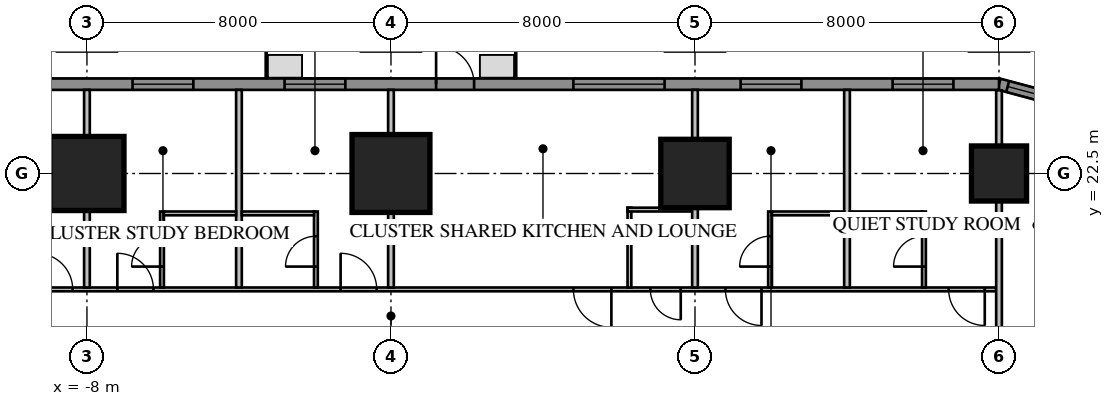
"""IFC4 building model, lengths in metres.
Left out: names, types, materials, properties, quantities, classifications, styles, units other than length and angle.
Written with IfcOpenShell. Run it as: python <this file> out.ifc"""

import sys

from ifc_helpers import new_model, si_unit, direction, frame, frame_2d, origin, origin_2d, place, context, subcontext, project, spatial, rectangle, extrude, element, fill, save


model = new_model("IFC4")
c1 = context("Model", 3, precision=1e-05, world=origin(), true_north=direction((0.0, 1.0)))
c2 = subcontext(c1, "Body", "Model", "MODEL_VIEW")
j1 = project(units=[si_unit("LENGTHUNIT", "METRE"), si_unit("PLANEANGLEUNIT", "RADIAN")], contexts=[c1])
p1 = place(None, origin())
s1 = spatial("IfcSite", under=j1, at=p1, CompositionType="ELEMENT")
p2 = place(p1, origin())
s2 = spatial("IfcBuilding", under=s1, at=p2, CompositionType="ELEMENT")
p3 = place(p2, frame((0.0, 0.0, 39.1)))
s3 = spatial("IfcBuildingStorey", under=s2, at=p3, CompositionType="ELEMENT", Elevation=39.1)
p4 = place(p3, frame((16.0, 22.5, 0.0), z_axis=(0.0, 0.0, 1.0), x_axis=(1.0, 0.0, 0.0)))
e1 = element("IfcColumn", 1, at=p4, inside=s3, PredefinedType="COLUMN", context=c2, shape_type="SweptSolid", body=[
    extrude(rectangle(XDim=1.45, YDim=1.45, at=origin_2d()), origin(), (0.0, 0.0, 1.0), 3.85),
])
p5 = place(p3, frame((8.0, 22.5, 0.0), z_axis=(0.0, 0.0, 1.0), x_axis=(1.0, 0.0, 0.0)))
e2 = element("IfcColumn", 2, at=p5, inside=s3, PredefinedType="COLUMN", context=c2, shape_type="SweptSolid", body=[
    extrude(rectangle(XDim=1.8, YDim=1.8, at=origin_2d()), origin(), (0.0, 0.0, 1.0), 3.85),
])
p6 = place(p3, frame((0.0, 22.5, 0.0), z_axis=(0.0, 0.0, 1.0), x_axis=(1.0, 0.0, 0.0)))
e3 = element("IfcColumn", 3, at=p6, inside=s3, PredefinedType="COLUMN", context=c2, shape_type="SweptSolid", body=[
    extrude(rectangle(XDim=2.05, YDim=2.05, at=origin_2d()), origin(), (0.0, 0.0, 1.0), 3.85),
])
p7 = place(p3, frame((-8.0, 22.5, 0.0), z_axis=(0.0, 0.0, 1.0), x_axis=(1.0, 0.0, 0.0)))
e4 = element("IfcColumn", 4, at=p7, inside=s3, PredefinedType="COLUMN", context=c2, shape_type="SweptSolid", body=[
    extrude(rectangle(XDim=1.95, YDim=1.95, at=origin_2d()), origin(), (0.0, 0.0, 1.0), 3.85),
])
p8 = place(p3, frame((20.425, 23.664, 0.0), z_axis=(0.0, 0.0, 1.0), x_axis=(-0.965920218567, 0.258839972501, 0.0)))
e5 = element("IfcWall", 5, at=p8, inside=s3, PredefinedType="SOLIDWALL", context=c2, shape_type="SweptSolid", body=[
    extrude(rectangle(XDim=4.581, YDim=0.3, at=frame_2d((2.291, 0.0))), origin(), (0.0, 0.0, 1.0), 3.65),
])
p9 = place(p8, frame((2.746, 0.0, 0.75)))
e6 = element("IfcOpeningElement", 6, at=p9, cuts=e5, PredefinedType="OPENING", context=c2, shape_type="SweptSolid", body=[
    extrude(rectangle(XDim=1.6, YDim=1.8, at=frame_2d((0.8, 0.9))), frame((0.0, 0.17, 0.0), z_axis=(0.0, -1.0, 0.0), x_axis=(1.0, 0.0, 0.0)), (0.0, 0.0, 1.0), 0.34),
])
p10 = place(p3, frame((16.0, 24.85, 0.0), z_axis=(0.0, 0.0, 1.0), x_axis=(-1.0, 0.0, 0.0)))
e7 = element("IfcWall", 7, at=p10, inside=s3, PredefinedType="SOLIDWALL", context=c2, shape_type="SweptSolid", body=[
    extrude(rectangle(XDim=32.0, YDim=0.3, at=frame_2d((16.0, 0.0))), origin(), (0.0, 0.0, 1.0), 3.65),
])
p11 = place(p10, frame((1.2, 0.0, 0.75)))
e8 = element("IfcOpeningElement", 8, at=p11, cuts=e7, PredefinedType="OPENING", context=c2, shape_type="SweptSolid", body=[
    extrude(rectangle(XDim=1.6, YDim=1.8, at=frame_2d((0.8, 0.9))), frame((0.0, 0.17, 0.0), z_axis=(0.0, -1.0, 0.0), x_axis=(1.0, 0.0, 0.0)), (0.0, 0.0, 1.0), 0.34),
])
p12 = place(p10, frame((5.2, 0.0, 0.75)))
e9 = element("IfcOpeningElement", 9, at=p12, cuts=e7, PredefinedType="OPENING", context=c2, shape_type="SweptSolid", body=[
    extrude(rectangle(XDim=1.6, YDim=1.8, at=frame_2d((0.8, 0.9))), frame((0.0, 0.17, 0.0), z_axis=(0.0, -1.0, 0.0), x_axis=(1.0, 0.0, 0.0)), (0.0, 0.0, 1.0), 0.34),
])
p13 = place(p10, frame((17.2, 0.0, 0.75)))
e10 = element("IfcOpeningElement", 10, at=p13, cuts=e7, PredefinedType="OPENING", context=c2, shape_type="SweptSolid", body=[
    extrude(rectangle(XDim=1.6, YDim=1.8, at=frame_2d((0.8, 0.9))), frame((0.0, 0.17, 0.0), z_axis=(0.0, -1.0, 0.0), x_axis=(1.0, 0.0, 0.0)), (0.0, 0.0, 1.0), 0.34),
])
p14 = place(p10, frame((21.2, 0.0, 0.75)))
e11 = element("IfcOpeningElement", 11, at=p14, cuts=e7, PredefinedType="OPENING", context=c2, shape_type="SweptSolid", body=[
    extrude(rectangle(XDim=1.6, YDim=1.8, at=frame_2d((0.8, 0.9))), frame((0.0, 0.17, 0.0), z_axis=(0.0, -1.0, 0.0), x_axis=(1.0, 0.0, 0.0)), (0.0, 0.0, 1.0), 0.34),
])
p15 = place(p10, frame((25.2, 0.0, 0.75)))
e12 = element("IfcOpeningElement", 12, at=p15, cuts=e7, PredefinedType="OPENING", context=c2, shape_type="SweptSolid", body=[
    extrude(rectangle(XDim=1.6, YDim=1.8, at=frame_2d((0.8, 0.9))), frame((0.0, 0.17, 0.0), z_axis=(0.0, -1.0, 0.0), x_axis=(1.0, 0.0, 0.0)), (0.0, 0.0, 1.0), 0.34),
])
p16 = place(p10, frame((29.2, 0.0, 0.75)))
e13 = element("IfcOpeningElement", 13, at=p16, cuts=e7, PredefinedType="OPENING", context=c2, shape_type="SweptSolid", body=[
    extrude(rectangle(XDim=1.6, YDim=1.8, at=frame_2d((0.8, 0.9))), frame((0.0, 0.17, 0.0), z_axis=(0.0, -1.0, 0.0), x_axis=(1.0, 0.0, 0.0)), (0.0, 0.0, 1.0), 0.34),
])
p17 = place(p10, frame((8.8, 0.0, 0.75)))
e14 = element("IfcOpeningElement", 14, at=p17, cuts=e7, PredefinedType="OPENING", context=c2, shape_type="SweptSolid", body=[
    extrude(rectangle(XDim=2.4, YDim=1.8, at=frame_2d((1.2, 0.9))), frame((0.0, 0.17, 0.0), z_axis=(0.0, -1.0, 0.0), x_axis=(1.0, 0.0, 0.0)), (0.0, 0.0, 1.0), 0.34),
])
p18 = place(p10, frame((13.812, 0.0, 0.0)))
e15 = element("IfcOpeningElement", 15, at=p18, cuts=e7, PredefinedType="OPENING", context=c2, shape_type="SweptSolid", body=[
    extrude(rectangle(XDim=1.0, YDim=2.4, at=frame_2d((0.5, 1.2))), frame((0.0, 0.17, 0.0), z_axis=(0.0, -1.0, 0.0), x_axis=(1.0, 0.0, 0.0)), (0.0, 0.0, 1.0), 0.34),
])
p19 = place(p3, frame((15.925, 19.45, 0.0), z_axis=(0.0, 0.0, 1.0), x_axis=(-1.0, 0.0, 0.0)))
e16 = element("IfcWall", 16, at=p19, inside=s3, PredefinedType="PARTITIONING", context=c2, shape_type="SweptSolid", body=[
    extrude(rectangle(XDim=31.85, YDim=0.1, at=frame_2d((15.925, 0.0))), origin(), (0.0, 0.0, 1.0), 3.65),
])
p20 = place(p19, frame((10.125, 0.0, 0.0)))
e17 = element("IfcOpeningElement", 17, at=p20, cuts=e16, PredefinedType="OPENING", context=c2, shape_type="SweptSolid", body=[
    extrude(rectangle(XDim=1.0, YDim=2.1, at=frame_2d((0.5, 1.05))), frame((0.0, 0.07, 0.0), z_axis=(0.0, -1.0, 0.0), x_axis=(1.0, 0.0, 0.0)), (0.0, 0.0, 1.0), 0.14),
])
p21 = place(p19, frame((8.3, 0.0, 0.0)))
e18 = element("IfcOpeningElement", 18, at=p21, cuts=e16, PredefinedType="OPENING", context=c2, shape_type="SweptSolid", body=[
    extrude(rectangle(XDim=0.8, YDim=2.1, at=frame_2d((0.4, 1.05))), frame((0.0, 0.07, 0.0), z_axis=(0.0, -1.0, 0.0), x_axis=(1.0, 0.0, 0.0)), (0.0, 0.0, 1.0), 0.14),
])
p22 = place(p19, frame((0.3, 0.0, 0.0)))
e19 = element("IfcOpeningElement", 19, at=p22, cuts=e16, PredefinedType="OPENING", context=c2, shape_type="SweptSolid", body=[
    extrude(rectangle(XDim=0.95, YDim=2.1, at=frame_2d((0.475, 1.05))), frame((0.0, 0.07, 0.0), z_axis=(0.0, -1.0, 0.0), x_axis=(1.0, 0.0, 0.0)), (0.0, 0.0, 1.0), 0.14),
])
p23 = place(p19, frame((6.175, 0.0, 0.0)))
e20 = element("IfcOpeningElement", 20, at=p23, cuts=e16, PredefinedType="OPENING", context=c2, shape_type="SweptSolid", body=[
    extrude(rectangle(XDim=0.95, YDim=2.1, at=frame_2d((0.475, 1.05))), frame((0.0, 0.07, 0.0), z_axis=(0.0, -1.0, 0.0), x_axis=(1.0, 0.0, 0.0)), (0.0, 0.0, 1.0), 0.14),
])
p24 = place(p19, frame((16.3, 0.0, 0.0)))
e21 = element("IfcOpeningElement", 21, at=p24, cuts=e16, PredefinedType="OPENING", context=c2, shape_type="SweptSolid", body=[
    extrude(rectangle(XDim=0.95, YDim=2.1, at=frame_2d((0.475, 1.05))), frame((0.0, 0.07, 0.0), z_axis=(0.0, -1.0, 0.0), x_axis=(1.0, 0.0, 0.0)), (0.0, 0.0, 1.0), 0.14),
])
p25 = place(p19, frame((22.175, 0.0, 0.0)))
e22 = element("IfcOpeningElement", 22, at=p25, cuts=e16, PredefinedType="OPENING", context=c2, shape_type="SweptSolid", body=[
    extrude(rectangle(XDim=0.95, YDim=2.1, at=frame_2d((0.475, 1.05))), frame((0.0, 0.07, 0.0), z_axis=(0.0, -1.0, 0.0), x_axis=(1.0, 0.0, 0.0)), (0.0, 0.0, 1.0), 0.14),
])
p26 = place(p19, frame((24.3, 0.0, 0.0)))
e23 = element("IfcOpeningElement", 23, at=p26, cuts=e16, PredefinedType="OPENING", context=c2, shape_type="SweptSolid", body=[
    extrude(rectangle(XDim=0.95, YDim=2.1, at=frame_2d((0.475, 1.05))), frame((0.0, 0.07, 0.0), z_axis=(0.0, -1.0, 0.0), x_axis=(1.0, 0.0, 0.0)), (0.0, 0.0, 1.0), 0.14),
])
p27 = place(p19, frame((30.175, 0.0, 0.0)))
e24 = element("IfcOpeningElement", 24, at=p27, cuts=e16, PredefinedType="OPENING", context=c2, shape_type="SweptSolid", body=[
    extrude(rectangle(XDim=0.95, YDim=2.1, at=frame_2d((0.475, 1.05))), frame((0.0, 0.07, 0.0), z_axis=(0.0, -1.0, 0.0), x_axis=(1.0, 0.0, 0.0)), (0.0, 0.0, 1.0), 0.14),
])
p28 = place(p3, frame((6.275, 19.5, 0.0), z_axis=(0.0, 0.0, 1.0), x_axis=(0.0, 1.0, 0.0)))
e25 = element("IfcWall", 25, at=p28, inside=s3, PredefinedType="PARTITIONING", context=c2, shape_type="SweptSolid", body=[
    extrude(rectangle(XDim=2.1, YDim=0.1, at=frame_2d((1.05, 0.0))), origin(), (0.0, 0.0, 1.0), 3.65),
])
p29 = place(p3, frame((7.925, 21.55, 0.0), z_axis=(0.0, 0.0, 1.0), x_axis=(-1.0, 0.0, 0.0)))
e26 = element("IfcWall", 26, at=p29, inside=s3, PredefinedType="PARTITIONING", context=c2, shape_type="SweptSolid", body=[
    extrude(rectangle(XDim=1.7, YDim=0.1, at=frame_2d((0.85, 0.0))), origin(), (0.0, 0.0, 1.0), 3.65),
])
p30 = place(p3, frame((16.0, 18.1, 0.0), z_axis=(0.0, 0.0, 1.0), x_axis=(0.0, 1.0, 0.0)))
e27 = element("IfcWall", 27, at=p30, inside=s3, PredefinedType="PARTITIONING", context=c2, shape_type="SweptSolid", body=[
    extrude(rectangle(XDim=6.589, YDim=0.15, at=frame_2d((3.295, 0.0))), origin(), (0.0, 0.0, 1.0), 3.65),
])
for number, where, z_axis, x_axis in (
    (28, (12.0, 19.5, 0.0), (0.0, 0.0, 1.0), (0.0, 1.0, 0.0)),
    (29, (8.0, 19.5, 0.0), (0.0, 0.0, 1.0), (0.0, 1.0, 0.0)),
):
    element("IfcWall", number, at=place(p3, frame(where, z_axis=z_axis, x_axis=x_axis)), inside=s3, PredefinedType="PARTITIONING", context=c2, shape_type="SweptSolid", body=[
        extrude(rectangle(XDim=5.2, YDim=0.15, at=frame_2d((2.6, 0.0))), origin(), (0.0, 0.0, 1.0), 3.65),
    ])
p31 = place(p3, frame((0.0, 19.5, 0.0), z_axis=(0.0, 0.0, 1.0), x_axis=(0.0, 1.0, 0.0)))
e30 = element("IfcWall", 30, at=p31, inside=s3, PredefinedType="PARTITIONING", context=c2, shape_type="SweptSolid", body=[
    extrude(rectangle(XDim=5.2, YDim=0.15, at=frame_2d((2.6, 0.0))), origin(), (0.0, 0.0, 1.0), 2.809),
])
for number, where, z_axis, x_axis in (
    (31, (-4.0, 19.5, 0.0), (0.0, 0.0, 1.0), (0.0, 1.0, 0.0)),
    (32, (-8.0, 19.5, 0.0), (0.0, 0.0, 1.0), (0.0, 1.0, 0.0)),
):
    element("IfcWall", number, at=place(p3, frame(where, z_axis=z_axis, x_axis=x_axis)), inside=s3, PredefinedType="PARTITIONING", context=c2, shape_type="SweptSolid", body=[
        extrude(rectangle(XDim=5.2, YDim=0.15, at=frame_2d((2.6, 0.0))), origin(), (0.0, 0.0, 1.0), 3.65),
    ])
p32 = place(p3, frame((14.025, 19.5, 0.0), z_axis=(0.0, 0.0, 1.0), x_axis=(0.0, 1.0, 0.0)))
e33 = element("IfcWall", 33, at=p32, inside=s3, PredefinedType="PARTITIONING", context=c2, shape_type="SweptSolid", body=[
    extrude(rectangle(XDim=2.0, YDim=0.1, at=frame_2d((1.0, 0.0))), origin(), (0.0, 0.0, 1.0), 3.65),
])
p33 = place(p32, frame((0.55, 0.0, 0.0)))
e34 = element("IfcOpeningElement", 34, at=p33, cuts=e33, PredefinedType="OPENING", context=c2, shape_type="SweptSolid", body=[
    extrude(rectangle(XDim=0.8, YDim=2.1, at=frame_2d((0.4, 1.05))), frame((0.0, 0.07, 0.0), z_axis=(0.0, -1.0, 0.0), x_axis=(1.0, 0.0, 0.0)), (0.0, 0.0, 1.0), 0.14),
])
p34 = place(p3, frame((13.975, 21.45, 0.0), z_axis=(0.0, 0.0, 1.0), x_axis=(-1.0, 0.0, 0.0)))
e35 = element("IfcWall", 35, at=p34, inside=s3, PredefinedType="PARTITIONING", context=c2, shape_type="SweptSolid", body=[
    extrude(rectangle(XDim=1.9, YDim=0.1, at=frame_2d((0.95, 0.0))), origin(), (0.0, 0.0, 1.0), 3.65),
])
p35 = place(p3, frame((9.975, 19.5, 0.0), z_axis=(0.0, 0.0, 1.0), x_axis=(0.0, 1.0, 0.0)))
e36 = element("IfcWall", 36, at=p35, inside=s3, PredefinedType="PARTITIONING", context=c2, shape_type="SweptSolid", body=[
    extrude(rectangle(XDim=2.0, YDim=0.1, at=frame_2d((1.0, 0.0))), origin(), (0.0, 0.0, 1.0), 3.65),
])
p36 = place(p35, frame((0.55, 0.0, 0.0)))
e37 = element("IfcOpeningElement", 37, at=p36, cuts=e36, PredefinedType="OPENING", context=c2, shape_type="SweptSolid", body=[
    extrude(rectangle(XDim=0.8, YDim=2.1, at=frame_2d((0.4, 1.05))), frame((0.0, 0.07, 0.0), z_axis=(0.0, -1.0, 0.0), x_axis=(1.0, 0.0, 0.0)), (0.0, 0.0, 1.0), 0.14),
])
p37 = place(p3, frame((11.925, 21.45, 0.0), z_axis=(0.0, 0.0, 1.0), x_axis=(-1.0, 0.0, 0.0)))
e38 = element("IfcWall", 38, at=p37, inside=s3, PredefinedType="PARTITIONING", context=c2, shape_type="SweptSolid", body=[
    extrude(rectangle(XDim=1.9, YDim=0.1, at=frame_2d((0.95, 0.0))), origin(), (0.0, 0.0, 1.0), 3.65),
])
p38 = place(p3, frame((-1.975, 19.5, 0.0), z_axis=(0.0, 0.0, 1.0), x_axis=(0.0, 1.0, 0.0)))
e39 = element("IfcWall", 39, at=p38, inside=s3, PredefinedType="PARTITIONING", context=c2, shape_type="SweptSolid", body=[
    extrude(rectangle(XDim=2.0, YDim=0.1, at=frame_2d((1.0, 0.0))), origin(), (0.0, 0.0, 1.0), 3.65),
])
p39 = place(p38, frame((0.55, 0.0, 0.0)))
e40 = element("IfcOpeningElement", 40, at=p39, cuts=e39, PredefinedType="OPENING", context=c2, shape_type="SweptSolid", body=[
    extrude(rectangle(XDim=0.8, YDim=2.1, at=frame_2d((0.4, 1.05))), frame((0.0, 0.07, 0.0), z_axis=(0.0, -1.0, 0.0), x_axis=(1.0, 0.0, 0.0)), (0.0, 0.0, 1.0), 0.14),
])
p40 = place(p3, frame((-2.025, 21.45, 0.0), z_axis=(0.0, 0.0, 1.0), x_axis=(-1.0, 0.0, 0.0)))
e41 = element("IfcWall", 41, at=p40, inside=s3, PredefinedType="PARTITIONING", context=c2, shape_type="SweptSolid", body=[
    extrude(rectangle(XDim=1.9, YDim=0.1, at=frame_2d((0.95, 0.0))), origin(), (0.0, 0.0, 1.0), 3.65),
])
p41 = place(p3, frame((-6.025, 19.5, 0.0), z_axis=(0.0, 0.0, 1.0), x_axis=(0.0, 1.0, 0.0)))
e42 = element("IfcWall", 42, at=p41, inside=s3, PredefinedType="PARTITIONING", context=c2, shape_type="SweptSolid", body=[
    extrude(rectangle(XDim=2.0, YDim=0.1, at=frame_2d((1.0, 0.0))), origin(), (0.0, 0.0, 1.0), 3.65),
])
p42 = place(p41, frame((0.55, 0.0, 0.0)))
e43 = element("IfcOpeningElement", 43, at=p42, cuts=e42, PredefinedType="OPENING", context=c2, shape_type="SweptSolid", body=[
    extrude(rectangle(XDim=0.8, YDim=2.1, at=frame_2d((0.4, 1.05))), frame((0.0, 0.07, 0.0), z_axis=(0.0, -1.0, 0.0), x_axis=(1.0, 0.0, 0.0)), (0.0, 0.0, 1.0), 0.14),
])
p43 = place(p3, frame((-4.075, 21.45, 0.0), z_axis=(0.0, 0.0, 1.0), x_axis=(-1.0, 0.0, 0.0)))
e44 = element("IfcWall", 44, at=p43, inside=s3, PredefinedType="PARTITIONING", context=c2, shape_type="SweptSolid", body=[
    extrude(rectangle(XDim=1.9, YDim=0.1, at=frame_2d((0.95, 0.0))), origin(), (0.0, 0.0, 1.0), 3.65),
])
p44 = place(p9, origin())
e45 = element("IfcWindow", 45, at=p44, inside=s3, PartitioningType="SINGLE_PANEL", PredefinedType="WINDOW", context=c2, shape_type="SweptSolid", body=[
    extrude(rectangle(XDim=1.6, YDim=1.8, at=frame_2d((0.8, 0.9))), frame((0.0, 0.03, 0.0), z_axis=(0.0, -1.0, 0.0), x_axis=(1.0, 0.0, 0.0)), (0.0, 0.0, 1.0), 0.06),
])
fill(e6, e45)
p45 = place(p11, origin())
e46 = element("IfcWindow", 46, at=p45, inside=s3, PartitioningType="SINGLE_PANEL", PredefinedType="WINDOW", context=c2, shape_type="SweptSolid", body=[
    extrude(rectangle(XDim=1.6, YDim=1.8, at=frame_2d((0.8, 0.9))), frame((0.0, 0.03, 0.0), z_axis=(0.0, -1.0, 0.0), x_axis=(1.0, 0.0, 0.0)), (0.0, 0.0, 1.0), 0.06),
])
fill(e8, e46)
p46 = place(p12, origin())
e47 = element("IfcWindow", 47, at=p46, inside=s3, PartitioningType="SINGLE_PANEL", PredefinedType="WINDOW", context=c2, shape_type="SweptSolid", body=[
    extrude(rectangle(XDim=1.6, YDim=1.8, at=frame_2d((0.8, 0.9))), frame((0.0, 0.03, 0.0), z_axis=(0.0, -1.0, 0.0), x_axis=(1.0, 0.0, 0.0)), (0.0, 0.0, 1.0), 0.06),
])
fill(e9, e47)
p47 = place(p13, origin())
e48 = element("IfcWindow", 48, at=p47, inside=s3, PartitioningType="SINGLE_PANEL", PredefinedType="WINDOW", context=c2, shape_type="SweptSolid", body=[
    extrude(rectangle(XDim=1.6, YDim=1.8, at=frame_2d((0.8, 0.9))), frame((0.0, 0.03, 0.0), z_axis=(0.0, -1.0, 0.0), x_axis=(1.0, 0.0, 0.0)), (0.0, 0.0, 1.0), 0.06),
])
fill(e10, e48)
p48 = place(p14, origin())
e49 = element("IfcWindow", 49, at=p48, inside=s3, PartitioningType="SINGLE_PANEL", PredefinedType="WINDOW", context=c2, shape_type="SweptSolid", body=[
    extrude(rectangle(XDim=1.6, YDim=1.8, at=frame_2d((0.8, 0.9))), frame((0.0, 0.03, 0.0), z_axis=(0.0, -1.0, 0.0), x_axis=(1.0, 0.0, 0.0)), (0.0, 0.0, 1.0), 0.06),
])
fill(e11, e49)
p49 = place(p17, origin())
e50 = element("IfcWindow", 50, at=p49, inside=s3, PartitioningType="SINGLE_PANEL", PredefinedType="WINDOW", context=c2, shape_type="SweptSolid", body=[
    extrude(rectangle(XDim=2.4, YDim=1.8, at=frame_2d((1.2, 0.9))), frame((0.0, 0.03, 0.0), z_axis=(0.0, -1.0, 0.0), x_axis=(1.0, 0.0, 0.0)), (0.0, 0.0, 1.0), 0.06),
])
fill(e14, e50)
p50 = place(p18, origin())
e51 = element("IfcDoor", 51, at=p50, inside=s3, OperationType="SINGLE_SWING_RIGHT", PredefinedType="DOOR", context=c2, shape_type="SweptSolid", body=[
    extrude(rectangle(XDim=1.0, YDim=2.4, at=frame_2d((0.5, 1.2))), frame((0.0, 0.025, 0.0), z_axis=(0.0, -1.0, 0.0), x_axis=(1.0, 0.0, 0.0)), (0.0, 0.0, 1.0), 0.05),
])
fill(e15, e51)
p51 = place(p20, origin())
e52 = element("IfcDoor", 52, at=p51, inside=s3, OperationType="SINGLE_SWING_LEFT", PredefinedType="DOOR", context=c2, shape_type="SweptSolid", body=[
    extrude(rectangle(XDim=1.0, YDim=2.1, at=frame_2d((0.5, 1.05))), frame((0.0, 0.025, 0.0), z_axis=(0.0, -1.0, 0.0), x_axis=(1.0, 0.0, 0.0)), (0.0, 0.0, 1.0), 0.05),
])
fill(e17, e52)
p52 = place(p21, origin())
e53 = element("IfcDoor", 53, at=p52, inside=s3, OperationType="SINGLE_SWING_LEFT", PredefinedType="DOOR", context=c2, shape_type="SweptSolid", body=[
    extrude(rectangle(XDim=0.8, YDim=2.1, at=frame_2d((0.4, 1.05))), frame((0.0, 0.025, 0.0), z_axis=(0.0, -1.0, 0.0), x_axis=(1.0, 0.0, 0.0)), (0.0, 0.0, 1.0), 0.05),
])
fill(e18, e53)
p53 = place(p22, origin())
e54 = element("IfcDoor", 54, at=p53, inside=s3, OperationType="SINGLE_SWING_LEFT", PredefinedType="DOOR", context=c2, shape_type="SweptSolid", body=[
    extrude(rectangle(XDim=0.95, YDim=2.1, at=frame_2d((0.475, 1.05))), frame((0.0, 0.025, 0.0), z_axis=(0.0, -1.0, 0.0), x_axis=(1.0, 0.0, 0.0)), (0.0, 0.0, 1.0), 0.05),
])
fill(e19, e54)
p54 = place(p33, origin())
e55 = element("IfcDoor", 55, at=p54, inside=s3, OperationType="SINGLE_SWING_LEFT", PredefinedType="DOOR", context=c2, shape_type="SweptSolid", body=[
    extrude(rectangle(XDim=0.8, YDim=2.1, at=frame_2d((0.4, 1.05))), frame((0.0, 0.025, 0.0), z_axis=(0.0, -1.0, 0.0), x_axis=(1.0, 0.0, 0.0)), (0.0, 0.0, 1.0), 0.05),
])
fill(e34, e55)
p55 = place(p23, origin())
e56 = element("IfcDoor", 56, at=p55, inside=s3, OperationType="SINGLE_SWING_LEFT", PredefinedType="DOOR", context=c2, shape_type="SweptSolid", body=[
    extrude(rectangle(XDim=0.95, YDim=2.1, at=frame_2d((0.475, 1.05))), frame((0.0, 0.025, 0.0), z_axis=(0.0, -1.0, 0.0), x_axis=(1.0, 0.0, 0.0)), (0.0, 0.0, 1.0), 0.05),
])
fill(e20, e56)
p56 = place(p36, origin())
e57 = element("IfcDoor", 57, at=p56, inside=s3, OperationType="SINGLE_SWING_LEFT", PredefinedType="DOOR", context=c2, shape_type="SweptSolid", body=[
    extrude(rectangle(XDim=0.8, YDim=2.1, at=frame_2d((0.4, 1.05))), frame((0.0, 0.025, 0.0), z_axis=(0.0, -1.0, 0.0), x_axis=(1.0, 0.0, 0.0)), (0.0, 0.0, 1.0), 0.05),
])
fill(e37, e57)
p57 = place(p24, origin())
e58 = element("IfcDoor", 58, at=p57, inside=s3, OperationType="SINGLE_SWING_RIGHT", PredefinedType="DOOR", context=c2, shape_type="SweptSolid", body=[
    extrude(rectangle(XDim=0.95, YDim=2.1, at=frame_2d((0.475, 1.05))), frame((0.0, 0.025, 0.0), z_axis=(0.0, -1.0, 0.0), x_axis=(1.0, 0.0, 0.0)), (0.0, 0.0, 1.0), 0.05),
])
fill(e21, e58)
p58 = place(p39, origin())
e59 = element("IfcDoor", 59, at=p58, inside=s3, OperationType="SINGLE_SWING_LEFT", PredefinedType="DOOR", context=c2, shape_type="SweptSolid", body=[
    extrude(rectangle(XDim=0.8, YDim=2.1, at=frame_2d((0.4, 1.05))), frame((0.0, 0.025, 0.0), z_axis=(0.0, -1.0, 0.0), x_axis=(1.0, 0.0, 0.0)), (0.0, 0.0, 1.0), 0.05),
])
fill(e40, e59)
p59 = place(p25, origin())
e60 = element("IfcDoor", 60, at=p59, inside=s3, OperationType="SINGLE_SWING_RIGHT", PredefinedType="DOOR", context=c2, shape_type="SweptSolid", body=[
    extrude(rectangle(XDim=0.95, YDim=2.1, at=frame_2d((0.475, 1.05))), frame((0.0, 0.025, 0.0), z_axis=(0.0, -1.0, 0.0), x_axis=(1.0, 0.0, 0.0)), (0.0, 0.0, 1.0), 0.05),
])
fill(e22, e60)
p60 = place(p42, origin())
e61 = element("IfcDoor", 61, at=p60, inside=s3, OperationType="SINGLE_SWING_LEFT", PredefinedType="DOOR", context=c2, shape_type="SweptSolid", body=[
    extrude(rectangle(XDim=0.8, YDim=2.1, at=frame_2d((0.4, 1.05))), frame((0.0, 0.025, 0.0), z_axis=(0.0, -1.0, 0.0), x_axis=(1.0, 0.0, 0.0)), (0.0, 0.0, 1.0), 0.05),
])
fill(e43, e61)
p61 = place(p26, origin())
e62 = element("IfcDoor", 62, at=p61, inside=s3, OperationType="SINGLE_SWING_RIGHT", PredefinedType="DOOR", context=c2, shape_type="SweptSolid", body=[
    extrude(rectangle(XDim=0.95, YDim=2.1, at=frame_2d((0.475, 1.05))), frame((0.0, 0.025, 0.0), z_axis=(0.0, -1.0, 0.0), x_axis=(1.0, 0.0, 0.0)), (0.0, 0.0, 1.0), 0.05),
])
fill(e23, e62)
save(model, sys.argv[1])
